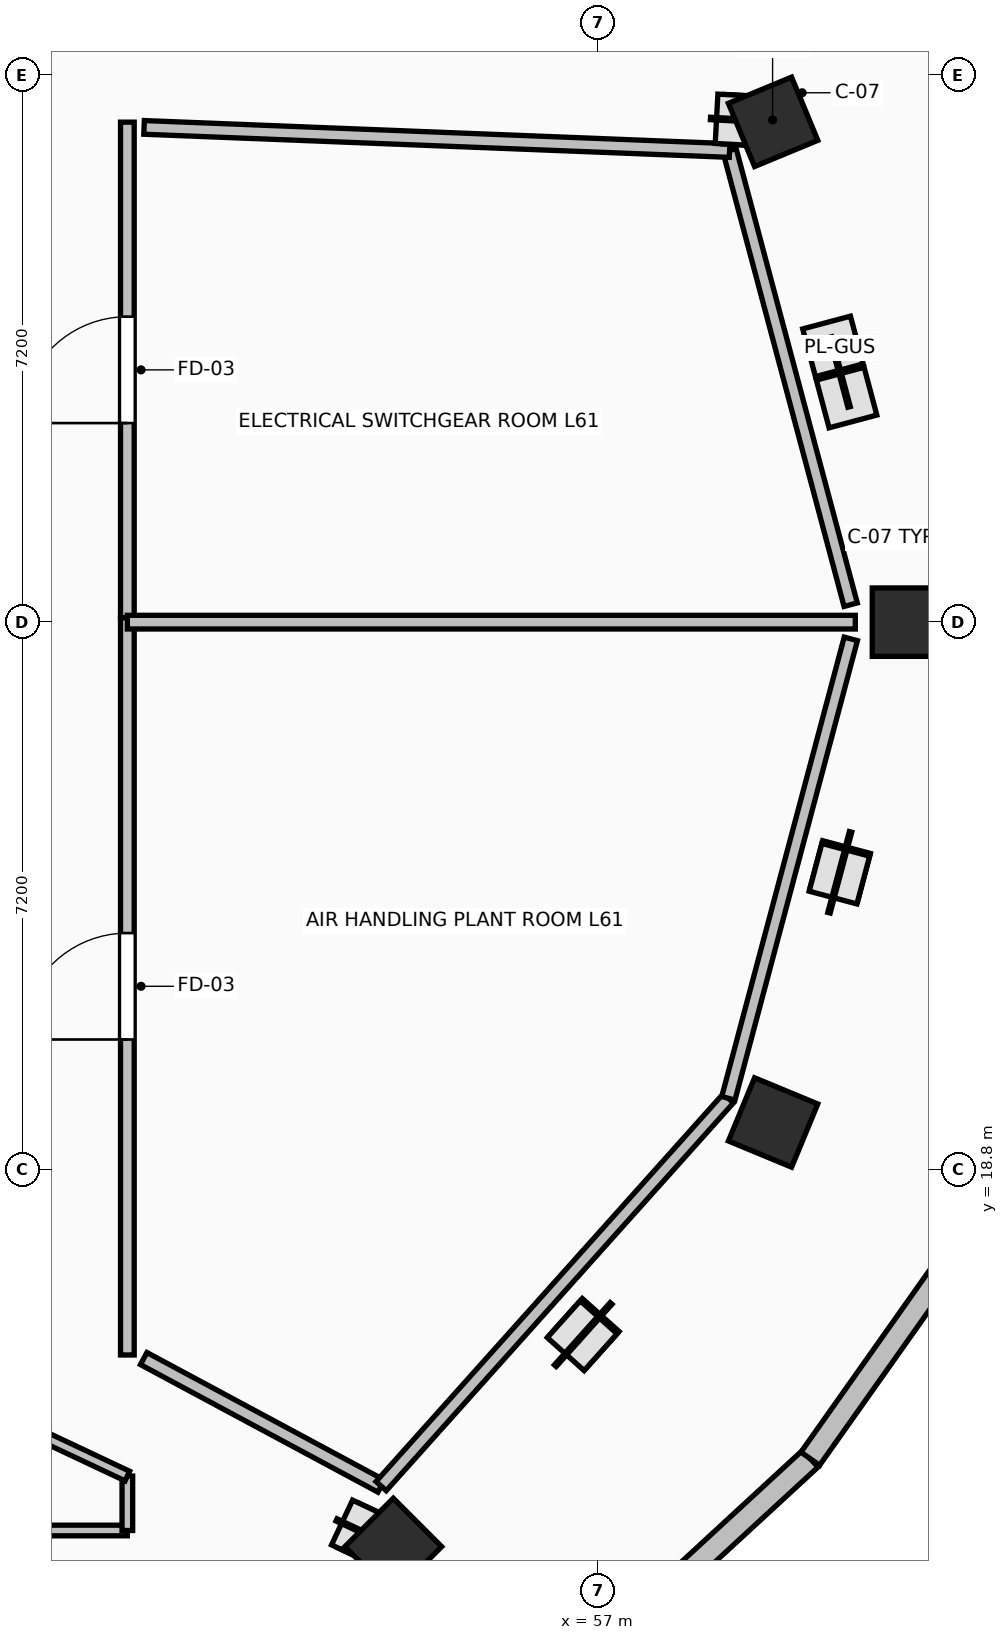
"""IFC4 building model, lengths in metres.
Left out: names, types, materials, properties, quantities, classifications, styles, units other than length and angle.
Written with IfcOpenShell. Run it as: python <this file> out.ifc"""

import sys

from ifc_helpers import new_model, si_unit, direction, frame, frame_2d, origin, origin_2d, place, context, subcontext, project, spatial, rectangle, extrude, element, fill, save


model = new_model("IFC4")
c1 = context("Model", 3, precision=1e-05, world=origin(), true_north=direction((0.0, 1.0)))
c2 = subcontext(c1, "Body", "Model", "MODEL_VIEW")
j1 = project(units=[si_unit("LENGTHUNIT", "METRE"), si_unit("PLANEANGLEUNIT", "RADIAN")], contexts=[c1])
p1 = place(None, origin())
s1 = spatial("IfcSite", under=j1, at=p1, CompositionType="ELEMENT")
p2 = place(p1, origin())
s2 = spatial("IfcBuilding", under=s1, at=p2, CompositionType="ELEMENT")
p3 = place(p2, frame((0.0, 0.0, 224.95)))
s3 = spatial("IfcBuildingStorey", under=s2, at=p3, CompositionType="ELEMENT", Elevation=224.95)
for number, where, z_axis, x_axis in (
    (1, (61.05, 26.0, 0.0), (0.0, 0.0, 1.0), (1.0, 0.0, 0.0)),
    (2, (59.295, 32.582, 0.0), (0.0, 0.0, 1.0), (0.924, 0.383, 0.0)),
    (3, (54.299, 13.838, 0.0), (0.0, 0.0, 1.0), (0.707, -0.707, 0.0)),
    (4, (59.295, 19.418, 0.0), (0.0, 0.0, 1.0), (0.924, -0.383, 0.0)),
):
    element("IfcColumn", number, at=place(p3, frame(where, z_axis=z_axis, x_axis=x_axis)), inside=s3, PredefinedType="COLUMN", context=c2, shape_type="SweptSolid", body=[
        extrude(rectangle(XDim=0.9, YDim=0.9, at=origin_2d()), origin(), (0.0, 0.0, 1.0), 4.8),
    ])
p4 = place(p3, frame((62.206, 33.581, 0.0), z_axis=(0.0, 0.0, 1.0), x_axis=(-0.577261247247, 0.816559521668, 0.0)))
e5 = element("IfcWall", 5, at=p4, inside=s3, PredefinedType="STANDARD", context=c2, shape_type="SweptSolid", body=[
    extrude(rectangle(XDim=4.194, YDim=0.3, at=frame_2d((2.097, 0.0))), origin(), (0.0, 0.0, 1.0), 4.5),
])
p5 = place(p3, frame((56.526, 11.992, 0.0), z_axis=(0.0, 0.0, 1.0), x_axis=(0.735445373611, 0.677584018727, 0.0)))
e6 = element("IfcWall", 6, at=p5, inside=s3, PredefinedType="STANDARD", context=c2, shape_type="SweptSolid", body=[
    extrude(rectangle(XDim=4.43, YDim=0.3, at=frame_2d((2.215, 0.0))), origin(), (0.0, 0.0, 1.0), 4.5),
])
p6 = place(p3, frame((59.784, 14.994, 0.0), z_axis=(0.0, 0.0, 1.0), x_axis=(0.577261247247, 0.816559521668, 0.0)))
e7 = element("IfcWall", 7, at=p6, inside=s3, PredefinedType="STANDARD", context=c2, shape_type="SweptSolid", body=[
    extrude(rectangle(XDim=4.194, YDim=0.3, at=frame_2d((2.097, 0.0))), origin(), (0.0, 0.0, 1.0), 4.5),
])
p7 = place(p3, frame((50.8, 16.359, 0.0), z_axis=(0.0, 0.0, 1.0), x_axis=(0.0, 1.0, 0.0)))
e8 = element("IfcWall", 8, at=p7, inside=s3, PredefinedType="PARTITIONING", context=c2, shape_type="SweptSolid", body=[
    extrude(rectangle(XDim=9.701, YDim=0.18, at=frame_2d((4.851, 0.0))), origin(), (0.0, 0.0, 1.0), 4.146),
])
p8 = place(p7, frame((4.15, 0.0, 0.0)))
e9 = element("IfcOpeningElement", 9, at=p8, cuts=e8, PredefinedType="OPENING", context=c2, shape_type="SweptSolid", body=[
    extrude(rectangle(XDim=1.4, YDim=2.2, at=frame_2d((0.7, 1.1))), frame((0.0, 0.105, 0.0), z_axis=(0.0, -1.0, 0.0), x_axis=(1.0, 0.0, 0.0)), (0.0, 0.0, 1.0), 0.21),
])
p9 = place(p3, frame((50.8, 26.06, 0.0), z_axis=(0.0, 0.0, 1.0), x_axis=(0.0, 1.0, 0.0)))
e10 = element("IfcWall", 10, at=p9, inside=s3, PredefinedType="PARTITIONING", context=c2, shape_type="SweptSolid", body=[
    extrude(rectangle(XDim=6.518, YDim=0.18, at=frame_2d((3.259, 0.0))), origin(), (0.0, 0.0, 1.0), 3.482),
])
p10 = place(p9, frame((2.559, 0.0, 0.0)))
e11 = element("IfcOpeningElement", 11, at=p10, cuts=e10, PredefinedType="OPENING", context=c2, shape_type="SweptSolid", body=[
    extrude(rectangle(XDim=1.4, YDim=2.2, at=frame_2d((0.7, 1.1))), frame((0.0, 0.105, 0.0), z_axis=(0.0, -1.0, 0.0), x_axis=(1.0, 0.0, 0.0)), (0.0, 0.0, 1.0), 0.21),
])
p11 = place(p3, frame((60.377, 26.0, 0.0), z_axis=(0.0, 0.0, 1.0), x_axis=(-1.0, 0.0, 0.0)))
e12 = element("IfcWall", 12, at=p11, inside=s3, PredefinedType="PARTITIONING", context=c2, shape_type="SweptSolid", body=[
    extrude(rectangle(XDim=9.577, YDim=0.18, at=frame_2d((4.789, 0.0))), origin(), (0.0, 0.0, 1.0), 3.482),
])
p12 = place(p3, frame((43.235, 14.05, 0.0), z_axis=(0.0, 0.0, 1.0), x_axis=(1.0, 0.0, 0.0)))
e13 = element("IfcWall", 13, at=p12, inside=s3, PredefinedType="PARTITIONING", context=c2, shape_type="SweptSolid", body=[
    extrude(rectangle(XDim=7.565, YDim=0.14, at=frame_2d((3.782, 0.0))), origin(), (0.0, 0.0, 1.0), 3.482),
])
p13 = place(p3, frame((50.8, 14.05, 0.0), z_axis=(0.0, 0.0, 1.0), x_axis=(0.0, 1.0, 0.0)))
e14 = element("IfcWall", 14, at=p13, inside=s3, PredefinedType="PARTITIONING", context=c2, shape_type="SweptSolid", body=[
    extrude(rectangle(XDim=0.716, YDim=0.14, at=frame_2d((0.358, 0.0))), origin(), (0.0, 0.0, 1.0), 4.232),
])
p14 = place(p3, frame((50.8, 14.766, 0.0), z_axis=(0.0, 0.0, 1.0), x_axis=(-0.904646647719, 0.426162460537, 0.0)))
e15 = element("IfcWall", 15, at=p14, inside=s3, PredefinedType="PARTITIONING", context=c2, shape_type="SweptSolid", body=[
    extrude(rectangle(XDim=1.222, YDim=0.14, at=frame_2d((0.611, 0.0))), origin(), (0.0, 0.0, 1.0), 4.146),
])
p15 = place(p3, frame((51.015, 16.312, 0.0), z_axis=(0.0, 0.0, 1.0), x_axis=(0.880963604882, -0.473184030662, 0.0)))
e16 = element("IfcWall", 16, at=p15, inside=s3, PredefinedType="PARTITIONING", context=c2, shape_type="SweptSolid", body=[
    extrude(rectangle(XDim=3.546, YDim=0.18, at=frame_2d((1.773, 0.0))), origin(), (0.0, 0.0, 1.0), 4.146),
])
p16 = place(p3, frame((54.139, 14.634, 0.0), z_axis=(0.0, 0.0, 1.0), x_axis=(0.667048046009, 0.745014700738, 0.0)))
e17 = element("IfcWall", 17, at=p16, inside=s3, PredefinedType="PARTITIONING", context=c2, shape_type="SweptSolid", body=[
    extrude(rectangle(XDim=6.848, YDim=0.18, at=frame_2d((3.424, 0.0))), origin(), (0.0, 0.0, 1.0), 3.482),
])
p17 = place(p3, frame((58.707, 19.736, 0.0), z_axis=(0.0, 0.0, 1.0), x_axis=(0.257567905164, 0.966260200065, 0.0)))
e18 = element("IfcWall", 18, at=p17, inside=s3, PredefinedType="PARTITIONING", context=c2, shape_type="SweptSolid", body=[
    extrude(rectangle(XDim=6.255, YDim=0.18, at=frame_2d((3.127, 0.0))), origin(), (0.0, 0.0, 1.0), 3.482),
])
p18 = place(p3, frame((60.316, 26.23, 0.0), z_axis=(0.0, 0.0, 1.0), x_axis=(-0.257611046893, 0.966248699103, 0.0)))
e19 = element("IfcWall", 19, at=p18, inside=s3, PredefinedType="PARTITIONING", context=c2, shape_type="SweptSolid", body=[
    extrude(rectangle(XDim=6.184, YDim=0.18, at=frame_2d((3.092, 0.0))), origin(), (0.0, 0.0, 1.0), 3.482),
])
p19 = place(p3, frame((58.723, 32.205, 0.0), z_axis=(0.0, 0.0, 1.0), x_axis=(-0.999222365292, 0.039429236626, 0.0)))
e20 = element("IfcWall", 20, at=p19, inside=s3, PredefinedType="PARTITIONING", context=c2, shape_type="SweptSolid", body=[
    extrude(rectangle(XDim=7.709, YDim=0.18, at=frame_2d((3.854, 0.0))), origin(), (0.0, 0.0, 1.0), 4.146),
])
p20 = place(p8, origin())
e21 = element("IfcDoor", 21, at=p20, inside=s3, OperationType="DOUBLE_SWING_LEFT", PredefinedType="DOOR", context=c2, shape_type="SweptSolid", body=[
    extrude(rectangle(XDim=1.4, YDim=2.2, at=frame_2d((0.7, 1.1))), frame((0.0, 0.025, 0.0), z_axis=(0.0, -1.0, 0.0), x_axis=(1.0, 0.0, 0.0)), (0.0, 0.0, 1.0), 0.05),
])
fill(e9, e21)
p21 = place(p10, origin())
e22 = element("IfcDoor", 22, at=p21, inside=s3, OperationType="DOUBLE_SWING_LEFT", PredefinedType="DOOR", context=c2, shape_type="SweptSolid", body=[
    extrude(rectangle(XDim=1.4, YDim=2.2, at=frame_2d((0.7, 1.1))), frame((0.0, 0.025, 0.0), z_axis=(0.0, -1.0, 0.0), x_axis=(1.0, 0.0, 0.0)), (0.0, 0.0, 1.0), 0.05),
])
fill(e11, e22)
save(model, sys.argv[1])
